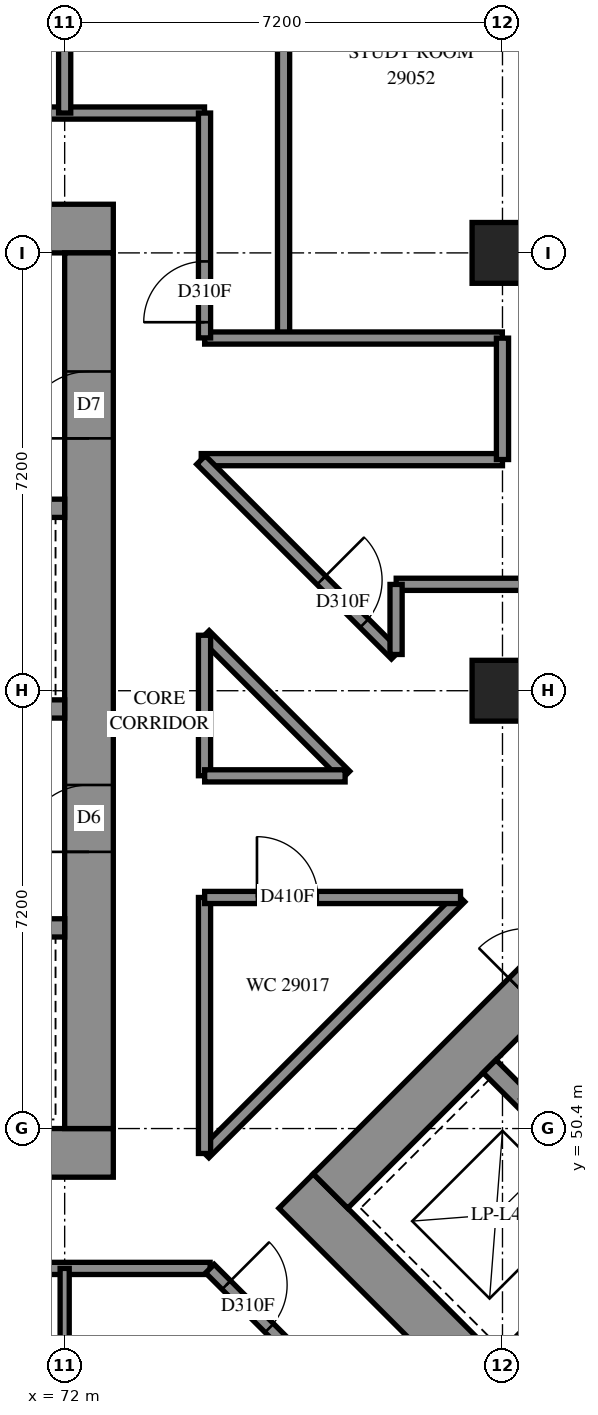
"""IFC4 building model, lengths in metres.
Left out: names, types, materials, properties, quantities, classifications, styles, units other than length and angle.
Written with IfcOpenShell. Run it as: python <this file> out.ifc"""

import sys

from ifc_helpers import new_model, si_unit, direction, frame, frame_2d, origin, origin_2d, place, context, subcontext, project, spatial, rectangle, extrude, element, fill, save


model = new_model("IFC4")
c1 = context("Model", 3, precision=1e-05, world=origin(), true_north=direction((0.0, 1.0)))
c2 = subcontext(c1, "Body", "Model", "MODEL_VIEW")
j1 = project(units=[si_unit("LENGTHUNIT", "METRE"), si_unit("PLANEANGLEUNIT", "RADIAN")], contexts=[c1])
p1 = place(None, origin())
s1 = spatial("IfcSite", under=j1, at=p1, CompositionType="ELEMENT")
p2 = place(p1, origin())
s2 = spatial("IfcBuilding", under=s1, at=p2, CompositionType="ELEMENT")
p3 = place(p2, frame((0.0, 0.0, 108.4)))
s3 = spatial("IfcBuildingStorey", under=s2, at=p3, CompositionType="ELEMENT", Elevation=108.4)
for number, where, z_axis, x_axis in (
    (1, (79.2, 57.6, 0.0), (0.0, 0.0, 1.0), (1.0, 0.0, 0.0)),
    (2, (79.2, 64.8, 0.0), (0.0, 0.0, 1.0), (1.0, 0.0, 0.0)),
):
    element("IfcColumn", number, at=place(p3, frame(where, z_axis=z_axis, x_axis=x_axis)), inside=s3, PredefinedType="COLUMN", context=c2, shape_type="SweptSolid", body=[
        extrude(rectangle(XDim=1.0, YDim=1.0, at=origin_2d()), origin(), (0.0, 0.0, 1.0), 3.1),
    ])
p4 = place(p3, frame((56.8, 50.0, -0.3), z_axis=(0.0, 0.0, 1.0), x_axis=(1.0, 0.0, 0.0)))
e3 = element("IfcWall", 3, at=p4, inside=s3, PredefinedType="SHEAR", context=c2, shape_type="SweptSolid", body=[
    extrude(rectangle(XDim=16.0, YDim=0.8, at=frame_2d((8.0, 0.0))), origin(), (0.0, 0.0, 1.0), 2.7),
])
p5 = place(p3, frame((56.8, 65.2, -0.3), z_axis=(0.0, 0.0, 1.0), x_axis=(1.0, 0.0, 0.0)))
e4 = element("IfcWall", 4, at=p5, inside=s3, PredefinedType="SHEAR", context=c2, shape_type="SweptSolid", body=[
    extrude(rectangle(XDim=16.0, YDim=0.8, at=frame_2d((8.0, 0.0))), origin(), (0.0, 0.0, 1.0), 2.7),
])
p6 = place(p5, frame((10.8, 0.0, 0.3)))
e5 = element("IfcOpeningElement", 5, at=p6, cuts=e4, PredefinedType="OPENING", context=c2, shape_type="SweptSolid", body=[
    extrude(rectangle(XDim=0.8, YDim=2.1, at=frame_2d((0.4, 1.05))), frame((0.0, 0.41, 0.0), z_axis=(0.0, -1.0, 0.0), x_axis=(1.0, 0.0, 0.0)), (0.0, 0.0, 1.0), 0.82),
])
p7 = place(p3, frame((72.4, 50.4, -0.3), z_axis=(0.0, 0.0, 1.0), x_axis=(0.0, 1.0, 0.0)))
e6 = element("IfcWall", 6, at=p7, inside=s3, PredefinedType="SHEAR", context=c2, shape_type="SweptSolid", body=[
    extrude(rectangle(XDim=14.4, YDim=0.8, at=frame_2d((7.2, 0.0))), origin(), (0.0, 0.0, 1.0), 2.7),
])
p8 = place(p7, frame((4.55, 0.0, 0.3)))
e7 = element("IfcOpeningElement", 7, at=p8, cuts=e6, PredefinedType="OPENING", context=c2, shape_type="SweptSolid", body=[
    extrude(rectangle(XDim=1.1, YDim=2.1, at=frame_2d((0.55, 1.05))), frame((0.0, 0.41, 0.0), z_axis=(0.0, -1.0, 0.0), x_axis=(1.0, 0.0, 0.0)), (0.0, 0.0, 1.0), 0.82),
])
p9 = place(p7, frame((11.35, 0.0, 0.3)))
e8 = element("IfcOpeningElement", 8, at=p9, cuts=e6, PredefinedType="OPENING", context=c2, shape_type="SweptSolid", body=[
    extrude(rectangle(XDim=1.1, YDim=2.1, at=frame_2d((0.55, 1.05))), frame((0.0, 0.41, 0.0), z_axis=(0.0, -1.0, 0.0), x_axis=(1.0, 0.0, 0.0)), (0.0, 0.0, 1.0), 0.82),
])
p10 = place(p3, frame((57.6, 53.7, 0.0), z_axis=(0.0, 0.0, 1.0), x_axis=(1.0, 0.0, 0.0)))
e9 = element("IfcWall", 9, at=p10, inside=s3, PredefinedType="SOLIDWALL", context=c2, shape_type="SweptSolid", body=[
    extrude(rectangle(XDim=14.4, YDim=0.3, at=frame_2d((7.2, 0.0))), origin(), (0.0, 0.0, 1.0), 3.1),
])
p11 = place(p10, frame((1.25, 0.0, 0.0)))
e10 = element("IfcOpeningElement", 10, at=p11, cuts=e9, PredefinedType="OPENING", context=c2, shape_type="SweptSolid", body=[
    extrude(rectangle(XDim=1.1, YDim=2.1, at=frame_2d((0.55, 1.05))), frame((0.0, 0.16, 0.0), z_axis=(0.0, -1.0, 0.0), x_axis=(1.0, 0.0, 0.0)), (0.0, 0.0, 1.0), 0.32),
])
p12 = place(p10, frame((4.85, 0.0, 0.0)))
e11 = element("IfcOpeningElement", 11, at=p12, cuts=e9, PredefinedType="OPENING", context=c2, shape_type="SweptSolid", body=[
    extrude(rectangle(XDim=1.1, YDim=2.1, at=frame_2d((0.55, 1.05))), frame((0.0, 0.16, 0.0), z_axis=(0.0, -1.0, 0.0), x_axis=(1.0, 0.0, 0.0)), (0.0, 0.0, 1.0), 0.32),
])
p13 = place(p10, frame((8.45, 0.0, 0.0)))
e12 = element("IfcOpeningElement", 12, at=p13, cuts=e9, PredefinedType="OPENING", context=c2, shape_type="SweptSolid", body=[
    extrude(rectangle(XDim=1.1, YDim=2.1, at=frame_2d((0.55, 1.05))), frame((0.0, 0.16, 0.0), z_axis=(0.0, -1.0, 0.0), x_axis=(1.0, 0.0, 0.0)), (0.0, 0.0, 1.0), 0.32),
])
p14 = place(p10, frame((12.05, 0.0, 0.0)))
e13 = element("IfcOpeningElement", 13, at=p14, cuts=e9, PredefinedType="OPENING", context=c2, shape_type="SweptSolid", body=[
    extrude(rectangle(XDim=1.1, YDim=2.1, at=frame_2d((0.55, 1.05))), frame((0.0, 0.16, 0.0), z_axis=(0.0, -1.0, 0.0), x_axis=(1.0, 0.0, 0.0)), (0.0, 0.0, 1.0), 0.32),
])
p15 = place(p3, frame((57.6, 57.3, 0.0), z_axis=(0.0, 0.0, 1.0), x_axis=(1.0, 0.0, 0.0)))
e14 = element("IfcWall", 14, at=p15, inside=s3, PredefinedType="SOLIDWALL", context=c2, shape_type="SweptSolid", body=[
    extrude(rectangle(XDim=14.4, YDim=0.3, at=frame_2d((7.2, 0.0))), origin(), (0.0, 0.0, 1.0), 3.1),
])
p16 = place(p15, frame((12.05, 0.0, 0.0)))
e15 = element("IfcOpeningElement", 15, at=p16, cuts=e14, PredefinedType="OPENING", context=c2, shape_type="SweptSolid", body=[
    extrude(rectangle(XDim=1.1, YDim=2.1, at=frame_2d((0.55, 1.05))), frame((0.0, 0.16, 0.0), z_axis=(0.0, -1.0, 0.0), x_axis=(1.0, 0.0, 0.0)), (0.0, 0.0, 1.0), 0.32),
])
p17 = place(p3, frame((64.8, 60.6, 0.0), z_axis=(0.0, 0.0, 1.0), x_axis=(1.0, 0.0, 0.0)))
e16 = element("IfcWall", 16, at=p17, inside=s3, PredefinedType="SOLIDWALL", context=c2, shape_type="SweptSolid", body=[
    extrude(rectangle(XDim=7.2, YDim=0.3, at=frame_2d((3.6, 0.0))), origin(), (0.0, 0.0, 1.0), 3.1),
])
p18 = place(p3, frame((75.806, 49.373, -0.3), z_axis=(0.0, 0.0, 1.0), x_axis=(0.7071067812, -0.7071067812, 0.0)))
e17 = element("IfcWall", 17, at=p18, inside=s3, PredefinedType="SHEAR", context=c2, shape_type="SweptSolid", body=[
    extrude(rectangle(XDim=16.0, YDim=0.8, at=frame_2d((8.0, 0.0))), origin(), (0.0, 0.0, 1.0), 2.7),
])
p19 = place(p3, frame((76.372, 49.373, -0.3), z_axis=(0.0, 0.0, 1.0), x_axis=(0.7071067812, 0.7071067812, 0.0)))
e18 = element("IfcWall", 18, at=p19, inside=s3, PredefinedType="SHEAR", context=c2, shape_type="SweptSolid", body=[
    extrude(rectangle(XDim=14.4, YDim=0.8, at=frame_2d((7.2, 0.0))), origin(), (0.0, 0.0, 1.0), 2.7),
])
p20 = place(p19, frame((4.55, 0.0, 0.3)))
e19 = element("IfcOpeningElement", 19, at=p20, cuts=e18, PredefinedType="OPENING", context=c2, shape_type="SweptSolid", body=[
    extrude(rectangle(XDim=1.1, YDim=2.1, at=frame_2d((0.55, 1.05))), frame((0.0, 0.41, 0.0), z_axis=(0.0, -1.0, 0.0), x_axis=(1.0, 0.0, 0.0)), (0.0, 0.0, 1.0), 0.82),
])
p21 = place(p19, frame((11.35, 0.0, 0.3)))
e20 = element("IfcOpeningElement", 20, at=p21, cuts=e18, PredefinedType="OPENING", context=c2, shape_type="SweptSolid", body=[
    extrude(rectangle(XDim=1.1, YDim=2.1, at=frame_2d((0.55, 1.05))), frame((0.0, 0.41, 0.0), z_axis=(0.0, -1.0, 0.0), x_axis=(1.0, 0.0, 0.0)), (0.0, 0.0, 1.0), 0.82),
])
p22 = place(p3, frame((79.2, 46.544, 0.0), z_axis=(0.0, 0.0, 1.0), x_axis=(0.7071219326, 0.7070916295, 0.0)))
e21 = element("IfcWall", 21, at=p22, inside=s3, PredefinedType="SOLIDWALL", context=c2, shape_type="SweptSolid", body=[
    extrude(rectangle(XDim=3.3, YDim=0.3, at=frame_2d((1.65, 0.0))), origin(), (0.0, 0.0, 1.0), 3.1),
])
p23 = place(p3, frame((78.988, 51.423, 0.0), z_axis=(0.0, 0.0, 1.0), x_axis=(0.7071067812, -0.7071067812, 0.0)))
e22 = element("IfcWall", 22, at=p23, inside=s3, PredefinedType="SOLIDWALL", context=c2, shape_type="SweptSolid", body=[
    extrude(rectangle(XDim=14.4, YDim=0.3, at=frame_2d((7.2, 0.0))), origin(), (0.0, 0.0, 1.0), 3.1),
])
p24 = place(p23, frame((1.25, 0.0, 0.0)))
e23 = element("IfcOpeningElement", 23, at=p24, cuts=e22, PredefinedType="OPENING", context=c2, shape_type="SweptSolid", body=[
    extrude(rectangle(XDim=1.1, YDim=2.1, at=frame_2d((0.55, 1.05))), frame((0.0, 0.16, 0.0), z_axis=(0.0, -1.0, 0.0), x_axis=(1.0, 0.0, 0.0)), (0.0, 0.0, 1.0), 0.32),
])
p25 = place(p23, frame((4.85, 0.0, 0.0)))
e24 = element("IfcOpeningElement", 24, at=p25, cuts=e22, PredefinedType="OPENING", context=c2, shape_type="SweptSolid", body=[
    extrude(rectangle(XDim=1.1, YDim=2.1, at=frame_2d((0.55, 1.05))), frame((0.0, 0.16, 0.0), z_axis=(0.0, -1.0, 0.0), x_axis=(1.0, 0.0, 0.0)), (0.0, 0.0, 1.0), 0.32),
])
p26 = place(p23, frame((8.45, 0.0, 0.0)))
e25 = element("IfcOpeningElement", 25, at=p26, cuts=e22, PredefinedType="OPENING", context=c2, shape_type="SweptSolid", body=[
    extrude(rectangle(XDim=1.1, YDim=2.1, at=frame_2d((0.55, 1.05))), frame((0.0, 0.16, 0.0), z_axis=(0.0, -1.0, 0.0), x_axis=(1.0, 0.0, 0.0)), (0.0, 0.0, 1.0), 0.32),
])
p27 = place(p23, frame((12.05, 0.0, 0.0)))
e26 = element("IfcOpeningElement", 26, at=p27, cuts=e22, PredefinedType="OPENING", context=c2, shape_type="SweptSolid", body=[
    extrude(rectangle(XDim=1.1, YDim=2.1, at=frame_2d((0.55, 1.05))), frame((0.0, 0.16, 0.0), z_axis=(0.0, -1.0, 0.0), x_axis=(1.0, 0.0, 0.0)), (0.0, 0.0, 1.0), 0.32),
])
p28 = place(p3, frame((55.3, 48.1, 0.0), z_axis=(0.0, 0.0, 1.0), x_axis=(1.0, 0.0, 0.0)))
e27 = element("IfcWall", 27, at=p28, inside=s3, PredefinedType="PARTITIONING", context=c2, shape_type="SweptSolid", body=[
    extrude(rectangle(XDim=19.092, YDim=0.2, at=frame_2d((9.546, 0.0))), origin(), (0.0, 0.0, 1.0), 3.1),
])
p29 = place(p28, frame((4.6, 0.0, 0.0)))
e28 = element("IfcOpeningElement", 28, at=p29, cuts=e27, PredefinedType="OPENING", context=c2, shape_type="SweptSolid", body=[
    extrude(rectangle(XDim=0.9, YDim=2.1, at=frame_2d((0.45, 1.05))), frame((0.0, 0.11, 0.0), z_axis=(0.0, -1.0, 0.0), x_axis=(1.0, 0.0, 0.0)), (0.0, 0.0, 1.0), 0.22),
])
p30 = place(p28, frame((8.239, 0.0, 0.0)))
e29 = element("IfcOpeningElement", 29, at=p30, cuts=e27, PredefinedType="OPENING", context=c2, shape_type="SweptSolid", body=[
    extrude(rectangle(XDim=0.9, YDim=2.1, at=frame_2d((0.45, 1.05))), frame((0.0, 0.11, 0.0), z_axis=(0.0, -1.0, 0.0), x_axis=(1.0, 0.0, 0.0)), (0.0, 0.0, 1.0), 0.22),
])
p31 = place(p28, frame((13.5, 0.0, 0.0)))
e30 = element("IfcOpeningElement", 30, at=p31, cuts=e27, PredefinedType="OPENING", context=c2, shape_type="SweptSolid", body=[
    extrude(rectangle(XDim=0.9, YDim=2.1, at=frame_2d((0.45, 1.05))), frame((0.0, 0.11, 0.0), z_axis=(0.0, -1.0, 0.0), x_axis=(1.0, 0.0, 0.0)), (0.0, 0.0, 1.0), 0.22),
])
p32 = place(p3, frame((55.3, 67.1, 0.0), z_axis=(0.0, 0.0, 1.0), x_axis=(1.0, 0.0, 0.0)))
e31 = element("IfcWall", 31, at=p32, inside=s3, PredefinedType="PARTITIONING", context=c2, shape_type="SweptSolid", body=[
    extrude(rectangle(XDim=19.0, YDim=0.2, at=frame_2d((9.5, 0.0))), origin(), (0.0, 0.0, 1.0), 3.1),
])
p33 = place(p32, frame((6.199, 0.0, 0.0)))
e32 = element("IfcOpeningElement", 32, at=p33, cuts=e31, PredefinedType="OPENING", context=c2, shape_type="SweptSolid", body=[
    extrude(rectangle(XDim=0.9, YDim=2.1, at=frame_2d((0.45, 1.05))), frame((0.0, 0.11, 0.0), z_axis=(0.0, -1.0, 0.0), x_axis=(1.0, 0.0, 0.0)), (0.0, 0.0, 1.0), 0.22),
])
p34 = place(p32, frame((13.399, 0.0, 0.0)))
e33 = element("IfcOpeningElement", 33, at=p34, cuts=e31, PredefinedType="OPENING", context=c2, shape_type="SweptSolid", body=[
    extrude(rectangle(XDim=0.9, YDim=2.1, at=frame_2d((0.45, 1.05))), frame((0.0, 0.11, 0.0), z_axis=(0.0, -1.0, 0.0), x_axis=(1.0, 0.0, 0.0)), (0.0, 0.0, 1.0), 0.22),
])
p35 = place(p3, frame((75.6, 63.4, 0.0), z_axis=(0.0, 0.0, 1.0), x_axis=(0.0, 1.0, 0.0)))
e34 = element("IfcWall", 34, at=p35, inside=s3, PredefinedType="PARTITIONING", context=c2, shape_type="SweptSolid", body=[
    extrude(rectangle(XDim=9.353, YDim=0.2, at=frame_2d((4.676, 0.0))), origin(), (0.0, 0.0, 1.0), 3.1),
])
p36 = place(p3, frame((74.301, 49.991, 0.0), z_axis=(0.0, 0.0, 1.0), x_axis=(0.7071067812, 0.7071067812, 0.0)))
e35 = element("IfcWall", 35, at=p36, inside=s3, PredefinedType="PARTITIONING", context=c2, shape_type="SweptSolid", body=[
    extrude(rectangle(XDim=5.951, YDim=0.2, at=frame_2d((2.975, 0.0))), origin(), (0.0, 0.0, 1.0), 3.1),
])
p37 = place(p3, frame((74.246, 61.4, 0.0), z_axis=(0.0, 0.0, 1.0), x_axis=(1.0, 0.0, 0.0)))
e36 = element("IfcWall", 36, at=p37, inside=s3, PredefinedType="PARTITIONING", context=c2, shape_type="SweptSolid", body=[
    extrude(rectangle(XDim=4.954, YDim=0.2, at=frame_2d((2.477, 0.0))), origin(), (0.0, 0.0, 1.0), 3.1),
])
p38 = place(p3, frame((74.302, 63.4, 0.0), z_axis=(0.0, 0.0, 1.0), x_axis=(1.0, 0.0, 0.0)))
e37 = element("IfcWall", 37, at=p38, inside=s3, PredefinedType="PARTITIONING", context=c2, shape_type="SweptSolid", body=[
    extrude(rectangle(XDim=4.896, YDim=0.2, at=frame_2d((2.448, 0.0))), origin(), (0.0, 0.0, 1.0), 3.1),
])
p39 = place(p3, frame((74.243, 61.395, 0.0), z_axis=(0.0, 0.0, 1.0), x_axis=(0.7071067812, -0.7071067812, 0.0)))
e38 = element("IfcWall", 38, at=p39, inside=s3, PredefinedType="PARTITIONING", context=c2, shape_type="SweptSolid", body=[
    extrude(rectangle(XDim=4.528, YDim=0.2, at=frame_2d((2.264, 0.0))), origin(), (0.0, 0.0, 1.0), 3.1),
])
p40 = place(p39, frame((2.797, 0.0, 0.0)))
e39 = element("IfcOpeningElement", 39, at=p40, cuts=e38, PredefinedType="OPENING", context=c2, shape_type="SweptSolid", body=[
    extrude(rectangle(XDim=1.0, YDim=2.1, at=frame_2d((0.5, 1.05))), frame((0.0, 0.11, 0.0), z_axis=(0.0, -1.0, 0.0), x_axis=(1.0, 0.0, 0.0)), (0.0, 0.0, 1.0), 0.22),
])
p41 = place(p3, frame((74.388, 48.096, 0.0), z_axis=(0.0, 0.0, 1.0), x_axis=(0.7071067812, -0.7071067812, 0.0)))
e40 = element("IfcWall", 40, at=p41, inside=s3, PredefinedType="PARTITIONING", context=c2, shape_type="SweptSolid", body=[
    extrude(rectangle(XDim=4.452, YDim=0.2, at=frame_2d((2.226, 0.0))), origin(), (0.0, 0.0, 1.0), 3.1),
])
p42 = place(p41, frame((0.382, 0.0, 0.0)))
e41 = element("IfcOpeningElement", 41, at=p42, cuts=e40, PredefinedType="OPENING", context=c2, shape_type="SweptSolid", body=[
    extrude(rectangle(XDim=1.0, YDim=2.1, at=frame_2d((0.5, 1.05))), frame((0.0, 0.11, 0.0), z_axis=(0.0, -1.0, 0.0), x_axis=(1.0, 0.0, 0.0)), (0.0, 0.0, 1.0), 0.22),
])
p43 = place(p3, frame((72.0, 67.1, 0.0), z_axis=(0.0, 0.0, 1.0), x_axis=(0.0, 1.0, 0.0)))
e42 = element("IfcWall", 42, at=p43, inside=s3, PredefinedType="PARTITIONING", context=c2, shape_type="SweptSolid", body=[
    extrude(rectangle(XDim=4.4, YDim=0.2, at=frame_2d((2.2, 0.0))), origin(), (0.0, 0.0, 1.0), 3.1),
])
p44 = place(p3, frame((74.3, 49.99, 0.0), z_axis=(0.0, 0.0, 1.0), x_axis=(0.0, 1.0, 0.0)))
e43 = element("IfcWall", 43, at=p44, inside=s3, PredefinedType="PARTITIONING", context=c2, shape_type="SweptSolid", body=[
    extrude(rectangle(XDim=4.21, YDim=0.2, at=frame_2d((2.105, 0.0))), origin(), (0.0, 0.0, 1.0), 3.1),
])
p45 = place(p3, frame((74.302, 54.2, 0.0), z_axis=(0.0, 0.0, 1.0), x_axis=(1.0, 0.0, 0.0)))
e44 = element("IfcWall", 44, at=p45, inside=s3, PredefinedType="PARTITIONING", context=c2, shape_type="SweptSolid", body=[
    extrude(rectangle(XDim=4.208, YDim=0.2, at=frame_2d((2.104, 0.0))), origin(), (0.0, 0.0, 1.0), 3.1),
])
p46 = place(p45, frame((0.86, 0.0, 0.0)))
e45 = element("IfcOpeningElement", 45, at=p46, cuts=e44, PredefinedType="OPENING", context=c2, shape_type="SweptSolid", body=[
    extrude(rectangle(XDim=1.0, YDim=2.1, at=frame_2d((0.5, 1.05))), frame((0.0, 0.11, 0.0), z_axis=(0.0, -1.0, 0.0), x_axis=(1.0, 0.0, 0.0)), (0.0, 0.0, 1.0), 0.22),
])
p47 = place(p3, frame((74.3, 63.402, 0.0), z_axis=(0.0, 0.0, 1.0), x_axis=(0.0, 1.0, 0.0)))
e46 = element("IfcWall", 46, at=p47, inside=s3, PredefinedType="PARTITIONING", context=c2, shape_type="SweptSolid", body=[
    extrude(rectangle(XDim=3.698, YDim=0.2, at=frame_2d((1.849, 0.0))), origin(), (0.0, 0.0, 1.0), 3.1),
])
p48 = place(p47, frame((0.258, 0.0, 0.0)))
e47 = element("IfcOpeningElement", 47, at=p48, cuts=e46, PredefinedType="OPENING", context=c2, shape_type="SweptSolid", body=[
    extrude(rectangle(XDim=1.0, YDim=2.1, at=frame_2d((0.5, 1.05))), frame((0.0, 0.11, 0.0), z_axis=(0.0, -1.0, 0.0), x_axis=(1.0, 0.0, 0.0)), (0.0, 0.0, 1.0), 0.22),
])
p49 = place(p3, frame((74.305, 58.517, 0.0), z_axis=(0.0, 0.0, 1.0), x_axis=(0.7071067812, -0.7071067812, 0.0)))
e48 = element("IfcWall", 48, at=p49, inside=s3, PredefinedType="PARTITIONING", context=c2, shape_type="SweptSolid", body=[
    extrude(rectangle(XDim=3.27, YDim=0.2, at=frame_2d((1.635, 0.0))), origin(), (0.0, 0.0, 1.0), 3.1),
])
p50 = place(p3, frame((72.0, 45.7, 0.0), z_axis=(0.0, 0.0, 1.0), x_axis=(0.0, 1.0, 0.0)))
e49 = element("IfcWall", 49, at=p50, inside=s3, PredefinedType="PARTITIONING", context=c2, shape_type="SweptSolid", body=[
    extrude(rectangle(XDim=2.4, YDim=0.15, at=frame_2d((1.2, 0.0))), origin(), (0.0, 0.0, 1.0), 3.1),
])
p51 = place(p3, frame((77.452, 59.35, 0.0), z_axis=(0.0, 0.0, 1.0), x_axis=(1.0, 0.0, 0.0)))
e50 = element("IfcWall", 50, at=p51, inside=s3, PredefinedType="PARTITIONING", context=c2, shape_type="SweptSolid", body=[
    extrude(rectangle(XDim=2.348, YDim=0.2, at=frame_2d((1.174, 0.0))), origin(), (0.0, 0.0, 1.0), 3.1),
])
for number, where, z_axis, x_axis in (
    (51, (74.3, 56.202, 0.0), (0.0, 0.0, 1.0), (0.0, 1.0, 0.0)),
    (52, (74.302, 56.2, 0.0), (0.0, 0.0, 1.0), (1.0, 0.0, 0.0)),
):
    element("IfcWall", number, at=place(p3, frame(where, z_axis=z_axis, x_axis=x_axis)), inside=s3, PredefinedType="PARTITIONING", context=c2, shape_type="SweptSolid", body=[
        extrude(rectangle(XDim=2.31, YDim=0.2, at=frame_2d((1.155, 0.0))), origin(), (0.0, 0.0, 1.0), 3.1),
    ])
p52 = place(p3, frame((79.2, 61.402, 0.0), z_axis=(0.0, 0.0, 1.0), x_axis=(0.0, 1.0, 0.0)))
e53 = element("IfcWall", 53, at=p52, inside=s3, PredefinedType="PARTITIONING", context=c2, shape_type="SweptSolid", body=[
    extrude(rectangle(XDim=1.996, YDim=0.2, at=frame_2d((0.998, 0.0))), origin(), (0.0, 0.0, 1.0), 3.1),
])
p53 = place(p3, frame((77.45, 58.196, 0.0), z_axis=(0.0, 0.0, 1.0), x_axis=(0.0, 1.0, 0.0)))
e54 = element("IfcWall", 54, at=p53, inside=s3, PredefinedType="PARTITIONING", context=c2, shape_type="SweptSolid", body=[
    extrude(rectangle(XDim=1.152, YDim=0.2, at=frame_2d((0.576, 0.0))), origin(), (0.0, 0.0, 1.0), 3.1),
])
p54 = place(p8, origin())
e55 = element("IfcDoor", 55, at=p54, inside=s3, OperationType="DOUBLE_DOOR_SINGLE_SWING", PredefinedType="DOOR", context=c2, shape_type="SweptSolid", body=[
    extrude(rectangle(XDim=1.1, YDim=2.1, at=frame_2d((0.55, 1.05))), frame((0.0, 0.025, 0.0), z_axis=(0.0, -1.0, 0.0), x_axis=(1.0, 0.0, 0.0)), (0.0, 0.0, 1.0), 0.05),
])
fill(e7, e55)
p55 = place(p9, origin())
e56 = element("IfcDoor", 56, at=p55, inside=s3, OperationType="SINGLE_SWING_RIGHT", PredefinedType="DOOR", context=c2, shape_type="SweptSolid", body=[
    extrude(rectangle(XDim=1.1, YDim=2.1, at=frame_2d((0.55, 1.05))), frame((0.0, 0.025, 0.0), z_axis=(0.0, -1.0, 0.0), x_axis=(1.0, 0.0, 0.0)), (0.0, 0.0, 1.0), 0.05),
])
fill(e8, e56)
p56 = place(p46, origin())
e57 = element("IfcDoor", 57, at=p56, inside=s3, OperationType="SINGLE_SWING_RIGHT", PredefinedType="DOOR", context=c2, shape_type="SweptSolid", body=[
    extrude(rectangle(XDim=1.0, YDim=2.1, at=frame_2d((0.5, 1.05))), frame((0.0, 0.025, 0.0), z_axis=(0.0, -1.0, 0.0), x_axis=(1.0, 0.0, 0.0)), (0.0, 0.0, 1.0), 0.05),
])
fill(e45, e57)
p57 = place(p48, origin())
e58 = element("IfcDoor", 58, at=p57, inside=s3, OperationType="SINGLE_SWING_RIGHT", PredefinedType="DOOR", context=c2, shape_type="SweptSolid", body=[
    extrude(rectangle(XDim=1.0, YDim=2.1, at=frame_2d((0.5, 1.05))), frame((0.0, 0.025, 0.0), z_axis=(0.0, -1.0, 0.0), x_axis=(1.0, 0.0, 0.0)), (0.0, 0.0, 1.0), 0.05),
])
fill(e47, e58)
p58 = place(p42, origin())
e59 = element("IfcDoor", 59, at=p58, inside=s3, OperationType="SINGLE_SWING_LEFT", PredefinedType="DOOR", context=c2, shape_type="SweptSolid", body=[
    extrude(rectangle(XDim=1.0, YDim=2.1, at=frame_2d((0.5, 1.05))), frame((0.0, 0.025, 0.0), z_axis=(0.0, -1.0, 0.0), x_axis=(1.0, 0.0, 0.0)), (0.0, 0.0, 1.0), 0.05),
])
fill(e41, e59)
p59 = place(p40, origin())
e60 = element("IfcDoor", 60, at=p59, inside=s3, OperationType="SINGLE_SWING_LEFT", PredefinedType="DOOR", context=c2, shape_type="SweptSolid", body=[
    extrude(rectangle(XDim=1.0, YDim=2.1, at=frame_2d((0.5, 1.05))), frame((0.0, 0.025, 0.0), z_axis=(0.0, -1.0, 0.0), x_axis=(1.0, 0.0, 0.0)), (0.0, 0.0, 1.0), 0.05),
])
fill(e39, e60)
save(model, sys.argv[1])
